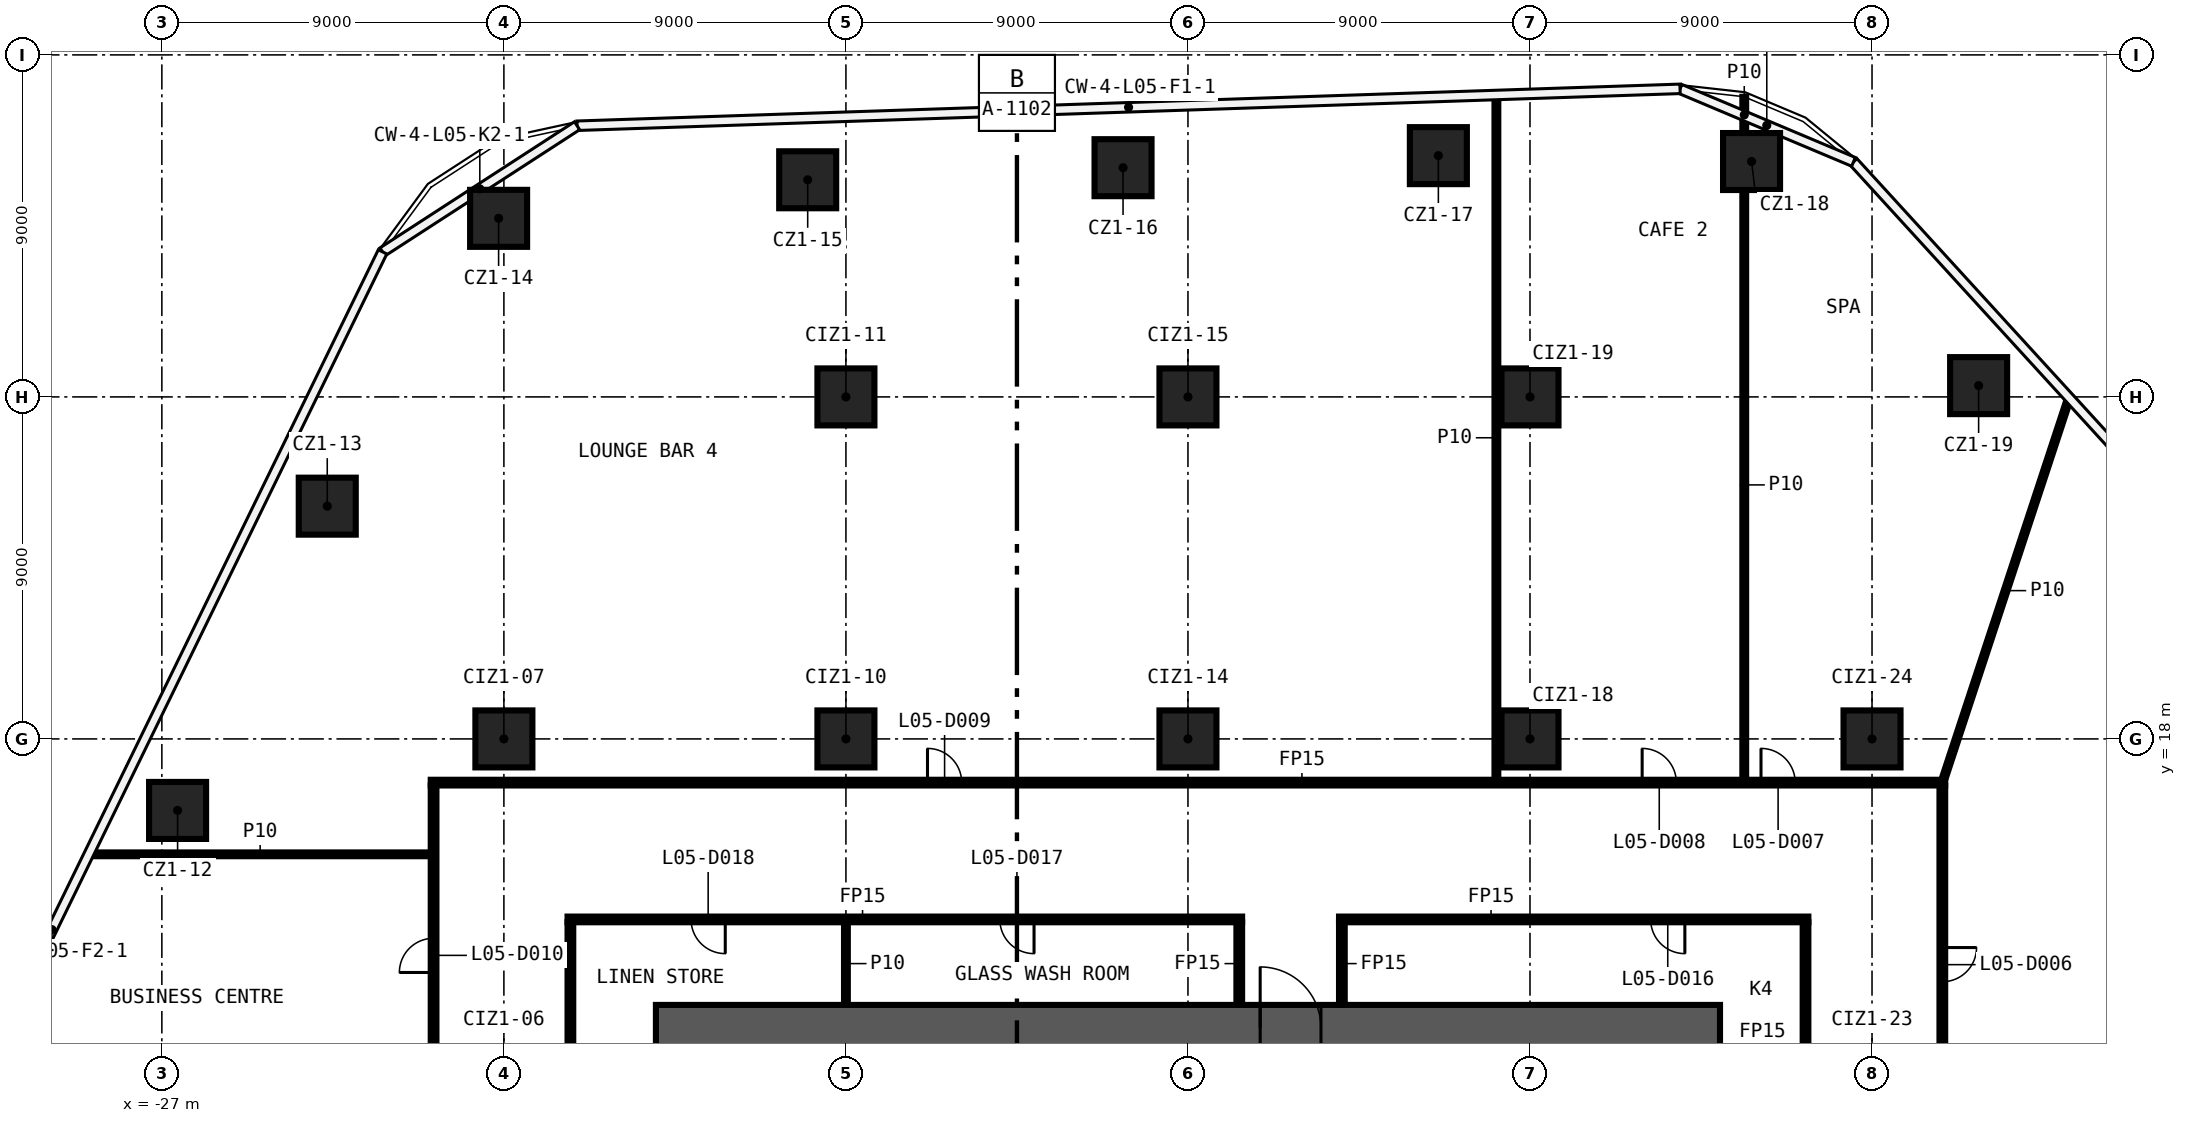
"""IFC4 building model, lengths in metres.
Left out: names, types, materials, properties, quantities, classifications, styles, units other than length and angle.
Written with IfcOpenShell. Run it as: python <this file> out.ifc"""

import sys

from ifc_helpers import new_model, si_unit, direction, frame, frame_2d, origin, origin_2d, place, context, subcontext, project, spatial, rectangle, extrude, element, fill, save


model = new_model("IFC4")
c1 = context("Model", 3, precision=1e-05, world=origin(), true_north=direction((0.0, 1.0)))
c2 = subcontext(c1, "Body", "Model", "MODEL_VIEW")
j1 = project(units=[si_unit("LENGTHUNIT", "METRE"), si_unit("PLANEANGLEUNIT", "RADIAN")], contexts=[c1])
p1 = place(None, origin())
s1 = spatial("IfcSite", under=j1, at=p1, CompositionType="ELEMENT")
p2 = place(p1, origin())
s2 = spatial("IfcBuilding", under=s1, at=p2, CompositionType="ELEMENT")
p3 = place(p2, frame((0.0, 0.0, 38.0)))
s3 = spatial("IfcBuildingStorey", under=s2, at=p3, CompositionType="ELEMENT", Elevation=38.0)
for number, where, z_axis, x_axis in (
    (1, (-26.586, 16.118, 0.0), (0.0, 0.0, 1.0), (1.0, 0.0, 0.0)),
    (2, (-22.648, 24.125, 0.0), (0.0, 0.0, 1.0), (1.0, 0.0, 0.0)),
    (3, (-18.139, 31.699, 0.0), (0.0, 0.0, 1.0), (1.0, 0.0, 0.0)),
    (4, (-10.006, 32.714, 0.0), (0.0, 0.0, 1.0), (1.0, 0.0, 0.0)),
    (5, (-1.708, 33.032, 0.0), (0.0, 0.0, 1.0), (1.0, 0.0, 0.0)),
    (6, (6.589, 33.349, 0.0), (0.0, 0.0, 1.0), (1.0, 0.0, 0.0)),
    (7, (14.83, 33.194, 0.0), (0.0, 0.0, 1.0), (1.0, 0.0, 0.0)),
    (8, (20.805, 27.297, 0.0), (0.0, 0.0, 1.0), (1.0, 0.0, 0.0)),
    (9, (-18.0, 18.0, 0.0), (0.0, 0.0, 1.0), (1.0, 0.0, 0.0)),
    (10, (-9.0, 18.0, 0.0), (0.0, 0.0, 1.0), (1.0, 0.0, 0.0)),
    (11, (-9.0, 27.0, 0.0), (0.0, 0.0, 1.0), (1.0, 0.0, 0.0)),
    (12, (0.0, 18.0, 0.0), (0.0, 0.0, 1.0), (1.0, 0.0, 0.0)),
    (13, (0.0, 27.0, 0.0), (0.0, 0.0, 1.0), (1.0, 0.0, 0.0)),
    (14, (9.0, 18.0, 0.0), (0.0, 0.0, 1.0), (1.0, 0.0, 0.0)),
    (15, (9.0, 27.0, 0.0), (0.0, 0.0, 1.0), (1.0, 0.0, 0.0)),
    (16, (18.0, 18.0, 0.0), (0.0, 0.0, 1.0), (1.0, 0.0, 0.0)),
):
    element("IfcColumn", number, at=place(p3, frame(where, z_axis=z_axis, x_axis=x_axis)), inside=s3, PredefinedType="COLUMN", context=c2, shape_type="SweptSolid", body=[
        extrude(rectangle(XDim=1.5, YDim=1.5, at=origin_2d()), origin(), (0.0, 0.0, 1.0), 5.6),
    ])
p4 = place(p3, frame((1.425, 13.25, 0.0), z_axis=(0.0, 0.0, 1.0), x_axis=(-1.0, 0.0, 0.0)))
e17 = element("IfcWall", 17, at=p4, inside=s3, PredefinedType="PARTITIONING", context=c2, shape_type="SweptSolid", body=[
    extrude(rectangle(XDim=17.75, YDim=0.15, at=frame_2d((8.875, 0.0))), origin(), (0.0, 0.0, 1.0), 5.6),
])
p5 = place(p4, frame((5.475, 0.0, 0.0)))
e18 = element("IfcOpeningElement", 18, at=p5, cuts=e17, PredefinedType="OPENING", context=c2, shape_type="SweptSolid", body=[
    extrude(rectangle(XDim=0.9, YDim=2.1, at=frame_2d((0.45, 1.05))), frame((0.0, 0.085, 0.0), z_axis=(0.0, -1.0, 0.0), x_axis=(1.0, 0.0, 0.0)), (0.0, 0.0, 1.0), 0.17),
])
p6 = place(p4, frame((13.6, 0.0, 0.0)))
e19 = element("IfcOpeningElement", 19, at=p6, cuts=e17, PredefinedType="OPENING", context=c2, shape_type="SweptSolid", body=[
    extrude(rectangle(XDim=0.9, YDim=2.1, at=frame_2d((0.45, 1.05))), frame((0.0, 0.085, 0.0), z_axis=(0.0, -1.0, 0.0), x_axis=(1.0, 0.0, 0.0)), (0.0, 0.0, 1.0), 0.17),
])
p7 = place(p3, frame((16.325, 13.25, 0.0), z_axis=(0.0, 0.0, 1.0), x_axis=(-1.0, 0.0, 0.0)))
e20 = element("IfcWall", 20, at=p7, inside=s3, PredefinedType="PARTITIONING", context=c2, shape_type="SweptSolid", body=[
    extrude(rectangle(XDim=12.35, YDim=0.15, at=frame_2d((6.175, 0.0))), origin(), (0.0, 0.0, 1.0), 5.6),
])
p8 = place(p7, frame((3.25, 0.0, 0.0)))
e21 = element("IfcOpeningElement", 21, at=p8, cuts=e20, PredefinedType="OPENING", context=c2, shape_type="SweptSolid", body=[
    extrude(rectangle(XDim=0.9, YDim=2.1, at=frame_2d((0.45, 1.05))), frame((0.0, 0.085, 0.0), z_axis=(0.0, -1.0, 0.0), x_axis=(1.0, 0.0, 0.0)), (0.0, 0.0, 1.0), 0.17),
])
p9 = place(p3, frame((-28.902, 14.963, 0.0), z_axis=(0.0, 0.0, 1.0), x_axis=(1.0, 0.0, 0.0)))
e22 = element("IfcWall", 22, at=p9, inside=s3, PredefinedType="PARTITIONING", context=c2, shape_type="SweptSolid", body=[
    extrude(rectangle(XDim=8.977, YDim=0.1, at=frame_2d((4.489, 0.0))), origin(), (0.0, 0.0, 1.0), 5.6),
])
p10 = place(p3, frame((-19.925, 16.85, 0.0), z_axis=(0.0, 0.0, 1.0), x_axis=(1.0, 0.0, 0.0)))
e23 = element("IfcWall", 23, at=p10, inside=s3, PredefinedType="PARTITIONING", context=c2, shape_type="SweptSolid", body=[
    extrude(rectangle(XDim=39.85, YDim=0.15, at=frame_2d((19.925, 0.0))), origin(), (0.0, 0.0, 1.0), 5.6),
])
p11 = place(p10, frame((35.004, 0.0, 0.0)))
e24 = element("IfcOpeningElement", 24, at=p11, cuts=e23, PredefinedType="OPENING", context=c2, shape_type="SweptSolid", body=[
    extrude(rectangle(XDim=0.9, YDim=2.1, at=frame_2d((0.45, 1.05))), frame((0.0, 0.085, 0.0), z_axis=(0.0, -1.0, 0.0), x_axis=(1.0, 0.0, 0.0)), (0.0, 0.0, 1.0), 0.17),
])
p12 = place(p10, frame((31.876, 0.0, 0.0)))
e25 = element("IfcOpeningElement", 25, at=p12, cuts=e23, PredefinedType="OPENING", context=c2, shape_type="SweptSolid", body=[
    extrude(rectangle(XDim=0.9, YDim=2.1, at=frame_2d((0.45, 1.05))), frame((0.0, 0.085, 0.0), z_axis=(0.0, -1.0, 0.0), x_axis=(1.0, 0.0, 0.0)), (0.0, 0.0, 1.0), 0.17),
])
p13 = place(p10, frame((13.071, 0.0, 0.0)))
e26 = element("IfcOpeningElement", 26, at=p13, cuts=e23, PredefinedType="OPENING", context=c2, shape_type="SweptSolid", body=[
    extrude(rectangle(XDim=0.9, YDim=2.1, at=frame_2d((0.45, 1.05))), frame((0.0, 0.085, 0.0), z_axis=(0.0, -1.0, 0.0), x_axis=(1.0, 0.0, 0.0)), (0.0, 0.0, 1.0), 0.17),
])
p14 = place(p3, frame((19.85, 16.85, 0.0), z_axis=(0.0, 0.0, 1.0), x_axis=(0.313004345266, 0.949751693784, 0.0)))
e27 = element("IfcWall", 27, at=p14, inside=s3, PredefinedType="PARTITIONING", context=c2, shape_type="SweptSolid", body=[
    extrude(rectangle(XDim=10.64, YDim=0.1, at=frame_2d((5.32, 0.0))), origin(), (0.0, 0.0, 1.0), 5.6),
])
p15 = place(p3, frame((19.85, 16.775, 0.0), z_axis=(0.0, 0.0, 1.0), x_axis=(0.0, -1.0, 0.0)))
e28 = element("IfcWall", 28, at=p15, inside=s3, PredefinedType="PARTITIONING", context=c2, shape_type="SweptSolid", body=[
    extrude(rectangle(XDim=33.55, YDim=0.15, at=frame_2d((16.775, 0.0))), origin(), (0.0, 0.0, 1.0), 5.6),
])
p16 = place(p15, frame((28.261, 0.0, 0.0)))
e29 = element("IfcOpeningElement", 29, at=p16, cuts=e28, PredefinedType="OPENING", context=c2, shape_type="SweptSolid", body=[
    extrude(rectangle(XDim=0.9, YDim=2.1, at=frame_2d((0.45, 1.05))), frame((0.0, 0.085, 0.0), z_axis=(0.0, -1.0, 0.0), x_axis=(1.0, 0.0, 0.0)), (0.0, 0.0, 1.0), 0.17),
])
p17 = place(p15, frame((19.36, 0.0, 0.0)))
e30 = element("IfcOpeningElement", 30, at=p17, cuts=e28, PredefinedType="OPENING", context=c2, shape_type="SweptSolid", body=[
    extrude(rectangle(XDim=0.9, YDim=2.1, at=frame_2d((0.45, 1.05))), frame((0.0, 0.085, 0.0), z_axis=(0.0, -1.0, 0.0), x_axis=(1.0, 0.0, 0.0)), (0.0, 0.0, 1.0), 0.17),
])
p18 = place(p15, frame((4.265, 0.0, 0.0)))
e31 = element("IfcOpeningElement", 31, at=p18, cuts=e28, PredefinedType="OPENING", context=c2, shape_type="SweptSolid", body=[
    extrude(rectangle(XDim=0.9, YDim=2.1, at=frame_2d((0.45, 1.05))), frame((0.0, 0.085, 0.0), z_axis=(0.0, -1.0, 0.0), x_axis=(1.0, 0.0, 0.0)), (0.0, 0.0, 1.0), 0.17),
])
p19 = place(p3, frame((16.25, -13.175, 0.0), z_axis=(0.0, 0.0, 1.0), x_axis=(0.0, 1.0, 0.0)))
e32 = element("IfcWall", 32, at=p19, inside=s3, PredefinedType="PARTITIONING", context=c2, shape_type="SweptSolid", body=[
    extrude(rectangle(XDim=26.35, YDim=0.15, at=frame_2d((13.175, 0.0))), origin(), (0.0, 0.0, 1.0), 5.6),
])
p20 = place(p19, frame((8.225, 0.0, 0.0)))
e33 = element("IfcOpeningElement", 33, at=p20, cuts=e32, PredefinedType="OPENING", context=c2, shape_type="SweptSolid", body=[
    extrude(rectangle(XDim=0.9, YDim=2.1, at=frame_2d((0.45, 1.05))), frame((0.0, 0.085, 0.0), z_axis=(0.0, -1.0, 0.0), x_axis=(1.0, 0.0, 0.0)), (0.0, 0.0, 1.0), 0.17),
])
p21 = place(p19, frame((17.225, 0.0, 0.0)))
e34 = element("IfcOpeningElement", 34, at=p21, cuts=e32, PredefinedType="OPENING", context=c2, shape_type="SweptSolid", body=[
    extrude(rectangle(XDim=0.9, YDim=2.1, at=frame_2d((0.45, 1.05))), frame((0.0, 0.085, 0.0), z_axis=(0.0, -1.0, 0.0), x_axis=(1.0, 0.0, 0.0)), (0.0, 0.0, 1.0), 0.17),
])
p22 = place(p3, frame((14.638, 16.925, 0.0), z_axis=(0.0, 0.0, 1.0), x_axis=(0.0, 1.0, 0.0)))
e35 = element("IfcWall", 35, at=p22, inside=s3, PredefinedType="PARTITIONING", context=c2, shape_type="SweptSolid", body=[
    extrude(rectangle(XDim=15.519, YDim=0.1, at=frame_2d((7.76, 0.0))), origin(), (0.0, 0.0, 1.0), 5.6),
])
p23 = place(p3, frame((14.638, 33.944, 0.0), z_axis=(0.0, 0.0, 1.0), x_axis=(0.0, 1.0, 0.0)))
e36 = element("IfcWall", 36, at=p23, inside=s3, PredefinedType="PARTITIONING", context=c2, shape_type="SweptSolid", body=[
    extrude(rectangle(XDim=0.954, YDim=0.1, at=frame_2d((0.477, 0.0))), origin(), (0.0, 0.0, 1.0), 5.6),
])
p24 = place(p3, frame((8.116, 16.925, 0.0), z_axis=(0.0, 0.0, 1.0), x_axis=(0.0, 1.0, 0.0)))
e37 = element("IfcWall", 37, at=p24, inside=s3, PredefinedType="PARTITIONING", context=c2, shape_type="SweptSolid", body=[
    extrude(rectangle(XDim=18.0, YDim=0.1, at=frame_2d((9.0, 0.0))), origin(), (0.0, 0.0, 1.0), 5.6),
])
for number, where, z_axis, x_axis in (
    (38, (4.05, 11.0, 0.0), (0.0, 0.0, 1.0), (0.0, 1.0, 0.0)),
    (39, (1.35, 11.0, 0.0), (0.0, 0.0, 1.0), (0.0, 1.0, 0.0)),
):
    element("IfcWall", number, at=place(p3, frame(where, z_axis=z_axis, x_axis=x_axis)), inside=s3, PredefinedType="PARTITIONING", context=c2, shape_type="SweptSolid", body=[
        extrude(rectangle(XDim=2.175, YDim=0.15, at=frame_2d((1.087, 0.0))), origin(), (0.0, 0.0, 1.0), 5.6),
    ])
p25 = place(p3, frame((-9.0, 11.0, 0.0), z_axis=(0.0, 0.0, 1.0), x_axis=(0.0, 1.0, 0.0)))
e40 = element("IfcWall", 40, at=p25, inside=s3, PredefinedType="PARTITIONING", context=c2, shape_type="SweptSolid", body=[
    extrude(rectangle(XDim=2.175, YDim=0.1, at=frame_2d((1.087, 0.0))), origin(), (0.0, 0.0, 1.0), 5.6),
])
p26 = place(p3, frame((-16.25, 13.175, 0.0), z_axis=(0.0, 0.0, 1.0), x_axis=(0.0, -1.0, 0.0)))
e41 = element("IfcWall", 41, at=p26, inside=s3, PredefinedType="PARTITIONING", context=c2, shape_type="SweptSolid", body=[
    extrude(rectangle(XDim=26.35, YDim=0.15, at=frame_2d((13.175, 0.0))), origin(), (0.0, 0.0, 1.0), 5.6),
])
p27 = place(p26, frame((17.225, 0.0, 0.0)))
e42 = element("IfcOpeningElement", 42, at=p27, cuts=e41, PredefinedType="OPENING", context=c2, shape_type="SweptSolid", body=[
    extrude(rectangle(XDim=0.9, YDim=2.1, at=frame_2d((0.45, 1.05))), frame((0.0, 0.085, 0.0), z_axis=(0.0, -1.0, 0.0), x_axis=(1.0, 0.0, 0.0)), (0.0, 0.0, 1.0), 0.17),
])
p28 = place(p26, frame((8.225, 0.0, 0.0)))
e43 = element("IfcOpeningElement", 43, at=p28, cuts=e41, PredefinedType="OPENING", context=c2, shape_type="SweptSolid", body=[
    extrude(rectangle(XDim=0.9, YDim=2.1, at=frame_2d((0.45, 1.05))), frame((0.0, 0.085, 0.0), z_axis=(0.0, -1.0, 0.0), x_axis=(1.0, 0.0, 0.0)), (0.0, 0.0, 1.0), 0.17),
])
p29 = place(p3, frame((-19.85, -16.775, 0.0), z_axis=(0.0, 0.0, 1.0), x_axis=(0.0, 1.0, 0.0)))
e44 = element("IfcWall", 44, at=p29, inside=s3, PredefinedType="PARTITIONING", context=c2, shape_type="SweptSolid", body=[
    extrude(rectangle(XDim=33.55, YDim=0.15, at=frame_2d((16.775, 0.0))), origin(), (0.0, 0.0, 1.0), 5.6),
])
p30 = place(p29, frame((19.392, 0.0, 0.0)))
e45 = element("IfcOpeningElement", 45, at=p30, cuts=e44, PredefinedType="OPENING", context=c2, shape_type="SweptSolid", body=[
    extrude(rectangle(XDim=0.9, YDim=2.1, at=frame_2d((0.45, 1.05))), frame((0.0, 0.085, 0.0), z_axis=(0.0, -1.0, 0.0), x_axis=(1.0, 0.0, 0.0)), (0.0, 0.0, 1.0), 0.17),
])
p31 = place(p29, frame((4.251, 0.0, 0.0)))
e46 = element("IfcOpeningElement", 46, at=p31, cuts=e44, PredefinedType="OPENING", context=c2, shape_type="SweptSolid", body=[
    extrude(rectangle(XDim=0.9, YDim=2.1, at=frame_2d((0.45, 1.05))), frame((0.0, 0.085, 0.0), z_axis=(0.0, -1.0, 0.0), x_axis=(1.0, 0.0, 0.0)), (0.0, 0.0, 1.0), 0.17),
])
p32 = place(p29, frame((28.629, 0.0, 0.0)))
e47 = element("IfcOpeningElement", 47, at=p32, cuts=e44, PredefinedType="OPENING", context=c2, shape_type="SweptSolid", body=[
    extrude(rectangle(XDim=0.9, YDim=2.1, at=frame_2d((0.45, 1.05))), frame((0.0, 0.085, 0.0), z_axis=(0.0, -1.0, 0.0), x_axis=(1.0, 0.0, 0.0)), (0.0, 0.0, 1.0), 0.17),
])
p33 = place(p3, frame((-14.0, 10.4, 0.0), z_axis=(0.0, 0.0, 1.0), x_axis=(1.0, 0.0, 0.0)))
e48 = element("IfcWall", 48, at=p33, inside=s3, PredefinedType="SHEAR", context=c2, shape_type="SweptSolid", body=[
    extrude(rectangle(XDim=28.0, YDim=1.2, at=frame_2d((14.0, 0.0))), origin(), (0.0, 0.0, 1.0), 5.6),
])
p34 = place(p33, frame((15.9, 0.0, 0.0)))
e49 = element("IfcOpeningElement", 49, at=p34, cuts=e48, PredefinedType="OPENING", context=c2, shape_type="SweptSolid", body=[
    extrude(rectangle(XDim=1.6, YDim=2.1, at=frame_2d((0.8, 1.05))), frame((0.0, 0.61, 0.0), z_axis=(0.0, -1.0, 0.0), x_axis=(1.0, 0.0, 0.0)), (0.0, 0.0, 1.0), 1.22),
])
p35 = place(p18, origin())
e50 = element("IfcDoor", 50, at=p35, inside=s3, OperationType="SINGLE_SWING_LEFT", PredefinedType="DOOR", context=c2, shape_type="SweptSolid", body=[
    extrude(rectangle(XDim=0.9, YDim=2.1, at=frame_2d((0.45, 1.05))), frame((0.0, 0.025, 0.0), z_axis=(0.0, -1.0, 0.0), x_axis=(1.0, 0.0, 0.0)), (0.0, 0.0, 1.0), 0.05),
])
fill(e31, e50)
p36 = place(p11, origin())
e51 = element("IfcDoor", 51, at=p36, inside=s3, OperationType="SINGLE_SWING_RIGHT", PredefinedType="DOOR", context=c2, shape_type="SweptSolid", body=[
    extrude(rectangle(XDim=0.9, YDim=2.1, at=frame_2d((0.45, 1.05))), frame((0.0, 0.025, 0.0), z_axis=(0.0, -1.0, 0.0), x_axis=(1.0, 0.0, 0.0)), (0.0, 0.0, 1.0), 0.05),
])
fill(e24, e51)
p37 = place(p12, origin())
e52 = element("IfcDoor", 52, at=p37, inside=s3, OperationType="SINGLE_SWING_LEFT", PredefinedType="DOOR", context=c2, shape_type="SweptSolid", body=[
    extrude(rectangle(XDim=0.9, YDim=2.1, at=frame_2d((0.45, 1.05))), frame((0.0, 0.025, 0.0), z_axis=(0.0, -1.0, 0.0), x_axis=(1.0, 0.0, 0.0)), (0.0, 0.0, 1.0), 0.05),
])
fill(e25, e52)
p38 = place(p13, origin())
e53 = element("IfcDoor", 53, at=p38, inside=s3, OperationType="SINGLE_SWING_RIGHT", PredefinedType="DOOR", context=c2, shape_type="SweptSolid", body=[
    extrude(rectangle(XDim=0.9, YDim=2.1, at=frame_2d((0.45, 1.05))), frame((0.0, 0.025, 0.0), z_axis=(0.0, -1.0, 0.0), x_axis=(1.0, 0.0, 0.0)), (0.0, 0.0, 1.0), 0.05),
])
fill(e26, e53)
p39 = place(p32, origin())
e54 = element("IfcDoor", 54, at=p39, inside=s3, OperationType="SINGLE_SWING_LEFT", PredefinedType="DOOR", context=c2, shape_type="SweptSolid", body=[
    extrude(rectangle(XDim=0.9, YDim=2.1, at=frame_2d((0.45, 1.05))), frame((0.0, 0.025, 0.0), z_axis=(0.0, -1.0, 0.0), x_axis=(1.0, 0.0, 0.0)), (0.0, 0.0, 1.0), 0.05),
])
fill(e47, e54)
p40 = place(p8, origin())
e55 = element("IfcDoor", 55, at=p40, inside=s3, OperationType="SINGLE_SWING_LEFT", PredefinedType="DOOR", context=c2, shape_type="SweptSolid", body=[
    extrude(rectangle(XDim=0.9, YDim=2.1, at=frame_2d((0.45, 1.05))), frame((0.0, 0.025, 0.0), z_axis=(0.0, -1.0, 0.0), x_axis=(1.0, 0.0, 0.0)), (0.0, 0.0, 1.0), 0.05),
])
fill(e21, e55)
p41 = place(p5, origin())
e56 = element("IfcDoor", 56, at=p41, inside=s3, OperationType="SINGLE_SWING_RIGHT", PredefinedType="DOOR", context=c2, shape_type="SweptSolid", body=[
    extrude(rectangle(XDim=0.9, YDim=2.1, at=frame_2d((0.45, 1.05))), frame((0.0, 0.025, 0.0), z_axis=(0.0, -1.0, 0.0), x_axis=(1.0, 0.0, 0.0)), (0.0, 0.0, 1.0), 0.05),
])
fill(e18, e56)
p42 = place(p6, origin())
e57 = element("IfcDoor", 57, at=p42, inside=s3, OperationType="SINGLE_SWING_LEFT", PredefinedType="DOOR", context=c2, shape_type="SweptSolid", body=[
    extrude(rectangle(XDim=0.9, YDim=2.1, at=frame_2d((0.45, 1.05))), frame((0.0, 0.025, 0.0), z_axis=(0.0, -1.0, 0.0), x_axis=(1.0, 0.0, 0.0)), (0.0, 0.0, 1.0), 0.05),
])
fill(e19, e57)
p43 = place(p34, origin())
e58 = element("IfcDoor", 58, at=p43, inside=s3, OperationType="DOUBLE_DOOR_SINGLE_SWING", PredefinedType="DOOR", context=c2, shape_type="SweptSolid", body=[
    extrude(rectangle(XDim=1.6, YDim=2.1, at=frame_2d((0.8, 1.05))), frame((0.0, 0.025, 0.0), z_axis=(0.0, -1.0, 0.0), x_axis=(1.0, 0.0, 0.0)), (0.0, 0.0, 1.0), 0.05),
])
fill(e49, e58)
save(model, sys.argv[1])
